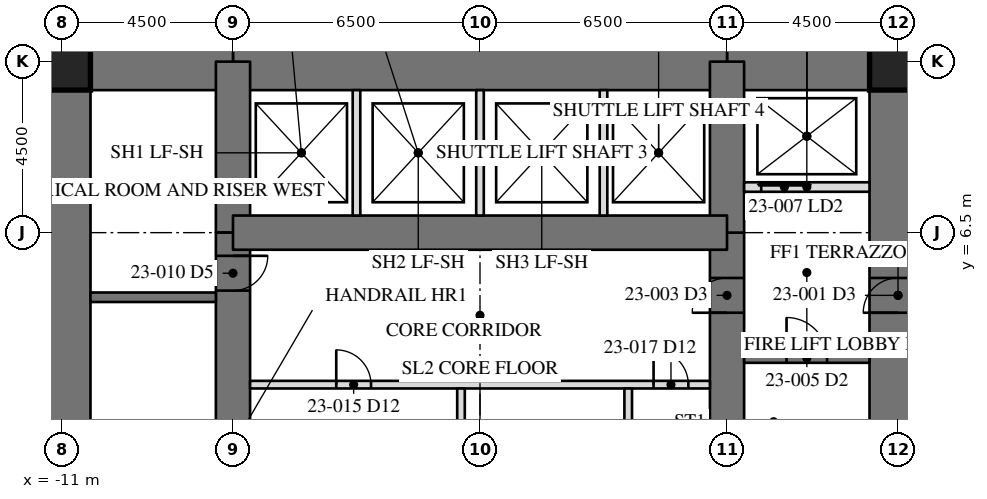
"""IFC4 building model, lengths in metres.
Left out: names, types, materials, properties, quantities, classifications, styles, units other than length and angle.
Written with IfcOpenShell. Run it as: python <this file> out.ifc"""

import sys

from ifc_helpers import new_model, si_unit, direction, frame, frame_2d, origin, origin_2d, place, context, subcontext, project, spatial, rectangle, hollow_rectangle, extrude, element, fill, save


model = new_model("IFC4")
c1 = context("Model", 3, precision=1e-05, world=origin(), true_north=direction((0.0, 1.0)))
c2 = subcontext(c1, "Body", "Model", "MODEL_VIEW")
j1 = project(units=[si_unit("LENGTHUNIT", "METRE"), si_unit("PLANEANGLEUNIT", "RADIAN")], contexts=[c1])
p1 = place(None, origin())
s1 = spatial("IfcSite", under=j1, at=p1, CompositionType="ELEMENT")
p2 = place(p1, origin())
s2 = spatial("IfcBuilding", under=s1, at=p2, CompositionType="ELEMENT")
p3 = place(p2, frame((0.0, 0.0, 100.8)))
s3 = spatial("IfcBuildingStorey", under=s2, at=p3, CompositionType="ELEMENT", Elevation=100.8)
p4 = place(p3, frame((11.0, -11.0, 0.0), z_axis=(0.0, 0.0, 1.0), x_axis=(0.0, 1.0, 0.0)))
e1 = element("IfcWall", 1, at=p4, inside=s3, PredefinedType="SHEAR", context=c2, shape_type="SweptSolid", body=[
    extrude(rectangle(XDim=22.0, YDim=1.5, at=frame_2d((11.0, 0.0))), origin(), (0.0, 0.0, 1.0), 4.1),
])
p5 = place(p4, frame((15.393, 0.0, 0.0)))
e2 = element("IfcOpeningElement", 2, at=p5, cuts=e1, PredefinedType="OPENING", context=c2, shape_type="SweptSolid", body=[
    extrude(rectangle(XDim=0.915, YDim=2.134, at=frame_2d((0.458, 1.067))), frame((0.0, 0.76, 0.0), z_axis=(0.0, -1.0, 0.0), x_axis=(1.0, 0.0, 0.0)), (0.0, 0.0, 1.0), 1.52),
])
p6 = place(p3, frame((-11.0, 11.0, 0.0), z_axis=(0.0, 0.0, 1.0), x_axis=(0.0, -1.0, 0.0)))
e3 = element("IfcWall", 3, at=p6, inside=s3, PredefinedType="SHEAR", context=c2, shape_type="SweptSolid", body=[
    extrude(rectangle(XDim=22.0, YDim=1.5, at=frame_2d((11.0, 0.0))), origin(), (0.0, 0.0, 1.0), 4.1),
])
p7 = place(p6, frame((15.393, 0.0, 0.0)))
e4 = element("IfcOpeningElement", 4, at=p7, cuts=e3, PredefinedType="OPENING", context=c2, shape_type="SweptSolid", body=[
    extrude(rectangle(XDim=0.915, YDim=2.134, at=frame_2d((0.458, 1.067))), frame((0.0, 0.76, 0.0), z_axis=(0.0, -1.0, 0.0), x_axis=(1.0, 0.0, 0.0)), (0.0, 0.0, 1.0), 1.52),
])
p8 = place(p3, frame((11.0, 11.0, 0.0), z_axis=(0.0, 0.0, 1.0), x_axis=(-1.0, 0.0, 0.0)))
e5 = element("IfcWall", 5, at=p8, inside=s3, PredefinedType="SHEAR", context=c2, shape_type="SweptSolid", body=[
    extrude(rectangle(XDim=4.5, YDim=1.5, at=frame_2d((2.25, 0.0))), origin(), (0.0, 0.0, 1.0), 4.1),
])
p9 = place(p3, frame((6.5, 11.0, 0.0), z_axis=(0.0, 0.0, 1.0), x_axis=(-1.0, 0.0, 0.0)))
e6 = element("IfcWall", 6, at=p9, inside=s3, PredefinedType="SHEAR", context=c2, shape_type="SweptSolid", body=[
    extrude(rectangle(XDim=13.0, YDim=1.5, at=frame_2d((6.5, 0.0))), origin(), (0.0, 0.0, 1.0), 4.1),
])
p10 = place(p3, frame((-6.5, 11.0, 0.0), z_axis=(0.0, 0.0, 1.0), x_axis=(-1.0, 0.0, 0.0)))
e7 = element("IfcWall", 7, at=p10, inside=s3, PredefinedType="SHEAR", context=c2, shape_type="SweptSolid", body=[
    extrude(rectangle(XDim=4.5, YDim=1.5, at=frame_2d((2.25, 0.0))), origin(), (0.0, 0.0, 1.0), 4.1),
])
p11 = place(p3, frame((6.5, -6.5, 0.0), z_axis=(0.0, 0.0, 1.0), x_axis=(0.0, 1.0, 0.0)))
e8 = element("IfcWall", 8, at=p11, inside=s3, PredefinedType="SHEAR", context=c2, shape_type="SweptSolid", body=[
    extrude(rectangle(XDim=13.0, YDim=0.9, at=frame_2d((6.5, 0.0))), origin(), (0.0, 0.0, 1.0), 4.1),
])
p12 = place(p11, frame((10.893, 0.0, 0.0)))
e9 = element("IfcOpeningElement", 9, at=p12, cuts=e8, PredefinedType="OPENING", context=c2, shape_type="SweptSolid", body=[
    extrude(rectangle(XDim=0.915, YDim=2.134, at=frame_2d((0.458, 1.067))), frame((0.0, 0.46, 0.0), z_axis=(0.0, -1.0, 0.0), x_axis=(1.0, 0.0, 0.0)), (0.0, 0.0, 1.0), 0.92),
])
p13 = place(p11, frame((0.61, 0.0, 0.0)))
e10 = element("IfcOpeningElement", 10, at=p13, cuts=e8, PredefinedType="OPENING", context=c2, shape_type="SweptSolid", body=[
    extrude(rectangle(XDim=0.915, YDim=2.134, at=frame_2d((0.458, 1.067))), frame((0.0, 0.46, 0.0), z_axis=(0.0, -1.0, 0.0), x_axis=(1.0, 0.0, 0.0)), (0.0, 0.0, 1.0), 0.92),
])
for number, where, z_axis, x_axis in (
    (11, (6.5, 6.5, 0.0), (0.0, 0.0, 1.0), (0.0, 1.0, 0.0)),
    (12, (-6.5, 11.0, 0.0), (0.0, 0.0, 1.0), (0.0, -1.0, 0.0)),
):
    element("IfcWall", number, at=place(p3, frame(where, z_axis=z_axis, x_axis=x_axis)), inside=s3, PredefinedType="SHEAR", context=c2, shape_type="SweptSolid", body=[
        extrude(rectangle(XDim=4.5, YDim=0.9, at=frame_2d((2.25, 0.0))), origin(), (0.0, 0.0, 1.0), 4.1),
    ])
p14 = place(p3, frame((-6.5, 6.5, 0.0), z_axis=(0.0, 0.0, 1.0), x_axis=(0.0, -1.0, 0.0)))
e13 = element("IfcWall", 13, at=p14, inside=s3, PredefinedType="SHEAR", context=c2, shape_type="SweptSolid", body=[
    extrude(rectangle(XDim=13.0, YDim=0.9, at=frame_2d((6.5, 0.0))), origin(), (0.0, 0.0, 1.0), 4.1),
])
p15 = place(p14, frame((10.893, 0.0, 0.0)))
e14 = element("IfcOpeningElement", 14, at=p15, cuts=e13, PredefinedType="OPENING", context=c2, shape_type="SweptSolid", body=[
    extrude(rectangle(XDim=0.915, YDim=2.134, at=frame_2d((0.458, 1.067))), frame((0.0, 0.46, 0.0), z_axis=(0.0, -1.0, 0.0), x_axis=(1.0, 0.0, 0.0)), (0.0, 0.0, 1.0), 0.92),
])
p16 = place(p14, frame((0.61, 0.0, 0.0)))
e15 = element("IfcOpeningElement", 15, at=p16, cuts=e13, PredefinedType="OPENING", context=c2, shape_type="SweptSolid", body=[
    extrude(rectangle(XDim=0.915, YDim=2.134, at=frame_2d((0.458, 1.067))), frame((0.0, 0.46, 0.0), z_axis=(0.0, -1.0, 0.0), x_axis=(1.0, 0.0, 0.0)), (0.0, 0.0, 1.0), 0.92),
])
p17 = place(p3, frame((6.5, 6.5, 0.0), z_axis=(0.0, 0.0, 1.0), x_axis=(-1.0, 0.0, 0.0)))
e16 = element("IfcWall", 16, at=p17, inside=s3, PredefinedType="SHEAR", context=c2, shape_type="SweptSolid", body=[
    extrude(rectangle(XDim=13.0, YDim=0.9, at=frame_2d((6.5, 0.0))), origin(), (0.0, 0.0, 1.0), 4.1),
])
for number, where, z_axis, x_axis in (
    (17, (11.0, 11.0, 0.0), (0.0, 0.0, 1.0), (1.0, 0.0, 0.0)),
    (18, (-11.0, 11.0, 0.0), (0.0, 0.0, 1.0), (1.0, 0.0, 0.0)),
):
    element("IfcColumn", number, at=place(p3, frame(where, z_axis=z_axis, x_axis=x_axis)), inside=s3, PredefinedType="COLUMN", context=c2, shape_type="SweptSolid", body=[
        extrude(hollow_rectangle(XDim=1.499, YDim=1.499, WallThickness=0.102, at=origin_2d()), origin(), (0.0, 0.0, 1.0), 4.1),
    ])
p18 = place(p3, frame((-6.95, 4.8, 0.0), z_axis=(0.0, 0.0, 1.0), x_axis=(-1.0, 0.0, 0.0)))
e19 = element("IfcWall", 19, at=p18, inside=s3, PredefinedType="SOLIDWALL", context=c2, shape_type="SweptSolid", body=[
    extrude(rectangle(XDim=3.3, YDim=0.25, at=frame_2d((1.65, 0.0))), origin(), (0.0, 0.0, 1.0), 3.91),
])
p19 = place(p3, frame((6.95, 3.2, 0.0), z_axis=(0.0, 0.0, 1.0), x_axis=(1.0, 0.0, 0.0)))
e20 = element("IfcWall", 20, at=p19, inside=s3, PredefinedType="SOLIDWALL", context=c2, shape_type="SweptSolid", body=[
    extrude(rectangle(XDim=3.3, YDim=0.25, at=frame_2d((1.65, 0.0))), origin(), (0.0, 0.0, 1.0), 3.91),
])
p20 = place(p19, frame((1.116, 0.0, 0.0)))
e21 = element("IfcOpeningElement", 21, at=p20, cuts=e20, PredefinedType="OPENING", context=c2, shape_type="SweptSolid", body=[
    extrude(rectangle(XDim=1.067, YDim=2.134, at=frame_2d((0.533, 1.067))), frame((0.0, 0.135, 0.0), z_axis=(0.0, -1.0, 0.0), x_axis=(1.0, 0.0, 0.0)), (0.0, 0.0, 1.0), 0.27),
])
p21 = place(p3, frame((6.95, 7.7, 0.0), z_axis=(0.0, 0.0, 1.0), x_axis=(1.0, 0.0, 0.0)))
e22 = element("IfcWall", 22, at=p21, inside=s3, PredefinedType="PARTITIONING", context=c2, shape_type="SweptSolid", body=[
    extrude(rectangle(XDim=3.3, YDim=0.25, at=frame_2d((1.65, 0.0))), origin(), (0.0, 0.0, 1.0), 3.91),
])
p22 = place(p21, frame((0.45, 0.0, 0.0)))
e23 = element("IfcOpeningElement", 23, at=p22, cuts=e22, PredefinedType="OPENING", context=c2, shape_type="SweptSolid", body=[
    extrude(rectangle(XDim=1.219, YDim=2.134, at=frame_2d((0.609, 1.067))), frame((0.0, 0.135, 0.0), z_axis=(0.0, -1.0, 0.0), x_axis=(1.0, 0.0, 0.0)), (0.0, 0.0, 1.0), 0.27),
])
p23 = place(p3, frame((-6.05, 2.5, 0.0), z_axis=(0.0, 0.0, 1.0), x_axis=(1.0, 0.0, 0.0)))
e24 = element("IfcWall", 24, at=p23, inside=s3, PredefinedType="PARTITIONING", context=c2, shape_type="SweptSolid", body=[
    extrude(rectangle(XDim=12.1, YDim=0.2, at=frame_2d((6.05, 0.0))), origin(), (0.0, 0.0, 1.0), 3.91),
])
p24 = place(p23, frame((2.268, 0.0, 0.0)))
e25 = element("IfcOpeningElement", 25, at=p24, cuts=e24, PredefinedType="OPENING", context=c2, shape_type="SweptSolid", body=[
    extrude(rectangle(XDim=0.915, YDim=2.134, at=frame_2d((0.458, 1.067))), frame((0.0, 0.11, 0.0), z_axis=(0.0, -1.0, 0.0), x_axis=(1.0, 0.0, 0.0)), (0.0, 0.0, 1.0), 0.22),
])
p25 = place(p23, frame((10.617, 0.0, 0.0)))
e26 = element("IfcOpeningElement", 26, at=p25, cuts=e24, PredefinedType="OPENING", context=c2, shape_type="SweptSolid", body=[
    extrude(rectangle(XDim=0.915, YDim=2.134, at=frame_2d((0.458, 1.067))), frame((0.0, 0.11, 0.0), z_axis=(0.0, -1.0, 0.0), x_axis=(1.0, 0.0, 0.0)), (0.0, 0.0, 1.0), 0.22),
])
for number, where, z_axis, x_axis in (
    (27, (-3.25, 6.95, 0.0), (0.0, 0.0, 1.0), (0.0, 1.0, 0.0)),
    (28, (0.0, 6.95, 0.0), (0.0, 0.0, 1.0), (0.0, 1.0, 0.0)),
    (29, (3.25, 6.95, 0.0), (0.0, 0.0, 1.0), (0.0, 1.0, 0.0)),
):
    element("IfcWall", number, at=place(p3, frame(where, z_axis=z_axis, x_axis=x_axis)), inside=s3, PredefinedType="PARTITIONING", context=c2, shape_type="SweptSolid", body=[
        extrude(rectangle(XDim=3.3, YDim=0.2, at=frame_2d((1.65, 0.0))), origin(), (0.0, 0.0, 1.0), 3.91),
    ])
for number, where, z_axis, x_axis in (
    (30, (-0.5, -2.4, 0.0), (0.0, 0.0, 1.0), (0.0, 1.0, 0.0)),
    (31, (3.9, -2.4, 0.0), (0.0, 0.0, 1.0), (0.0, 1.0, 0.0)),
):
    element("IfcWall", number, at=place(p3, frame(where, z_axis=z_axis, x_axis=x_axis)), inside=s3, PredefinedType="PARTITIONING", context=c2, shape_type="SweptSolid", body=[
        extrude(rectangle(XDim=4.8, YDim=0.2, at=frame_2d((2.4, 0.0))), origin(), (0.0, 0.0, 1.0), 3.91),
    ])
p26 = place(p12, origin())
e32 = element("IfcDoor", 32, at=p26, inside=s3, OperationType="SINGLE_SWING_RIGHT", PredefinedType="DOOR", context=c2, shape_type="SweptSolid", body=[
    extrude(rectangle(XDim=0.915, YDim=2.134, at=frame_2d((0.458, 1.067))), frame((0.0, -0.375, 0.0), z_axis=(0.0, -1.0, 0.0), x_axis=(1.0, 0.0, 0.0)), (0.0, 0.0, 1.0), 0.05),
])
fill(e9, e32)
p27 = place(p20, origin())
e33 = element("IfcDoor", 33, at=p27, inside=s3, OperationType="SINGLE_SWING_LEFT", PredefinedType="DOOR", context=c2, shape_type="SweptSolid", body=[
    extrude(rectangle(XDim=1.067, YDim=2.134, at=frame_2d((0.533, 1.067))), frame((0.0, 0.025, 0.0), z_axis=(0.0, -1.0, 0.0), x_axis=(1.0, 0.0, 0.0)), (0.0, 0.0, 1.0), 0.05),
])
fill(e21, e33)
p28 = place(p22, origin())
e34 = element("IfcDoor", 34, at=p28, inside=s3, OperationType="SLIDING_TO_LEFT", PredefinedType="DOOR", context=c2, shape_type="SweptSolid", body=[
    extrude(rectangle(XDim=1.219, YDim=2.134, at=frame_2d((0.609, 1.067))), frame((0.0, 0.025, 0.0), z_axis=(0.0, -1.0, 0.0), x_axis=(1.0, 0.0, 0.0)), (0.0, 0.0, 1.0), 0.05),
])
fill(e23, e34)
p29 = place(p16, origin())
e35 = element("IfcDoor", 35, at=p29, inside=s3, OperationType="SINGLE_SWING_RIGHT", PredefinedType="DOOR", context=c2, shape_type="SweptSolid", body=[
    extrude(rectangle(XDim=0.915, YDim=2.134, at=frame_2d((0.458, 1.067))), frame((0.0, -0.375, 0.0), z_axis=(0.0, -1.0, 0.0), x_axis=(1.0, 0.0, 0.0)), (0.0, 0.0, 1.0), 0.05),
])
fill(e15, e35)
p30 = place(p24, origin())
e36 = element("IfcDoor", 36, at=p30, inside=s3, OperationType="SINGLE_SWING_LEFT", PredefinedType="DOOR", context=c2, shape_type="SweptSolid", body=[
    extrude(rectangle(XDim=0.915, YDim=2.134, at=frame_2d((0.458, 1.067))), frame((0.0, 0.025, 0.0), z_axis=(0.0, -1.0, 0.0), x_axis=(1.0, 0.0, 0.0)), (0.0, 0.0, 1.0), 0.05),
])
fill(e25, e36)
p31 = place(p25, origin())
e37 = element("IfcDoor", 37, at=p31, inside=s3, OperationType="SINGLE_SWING_LEFT", PredefinedType="DOOR", context=c2, shape_type="SweptSolid", body=[
    extrude(rectangle(XDim=0.915, YDim=2.134, at=frame_2d((0.458, 1.067))), frame((0.0, 0.025, 0.0), z_axis=(0.0, -1.0, 0.0), x_axis=(1.0, 0.0, 0.0)), (0.0, 0.0, 1.0), 0.05),
])
fill(e26, e37)
save(model, sys.argv[1])
